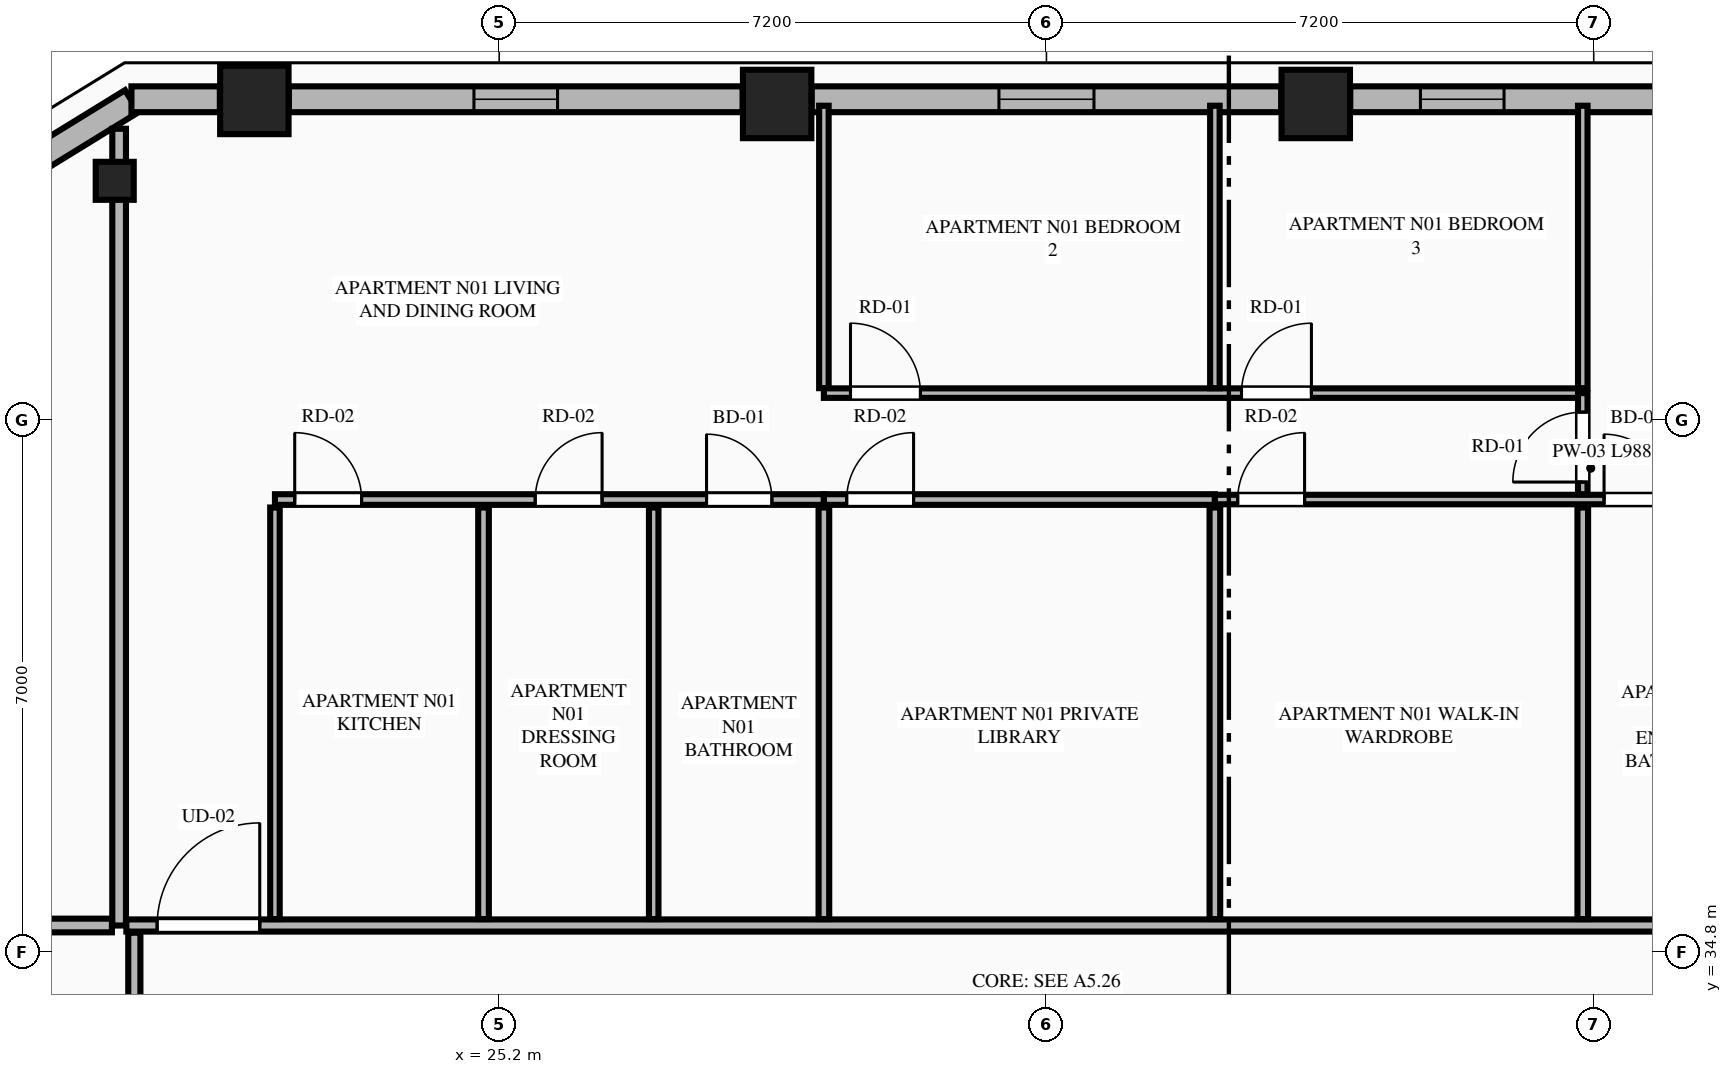
"""IFC4 building model, lengths in metres.
Left out: names, types, materials, properties, quantities, classifications, styles, units other than length and angle.
Written with IfcOpenShell. Run it as: python <this file> out.ifc"""

import sys

from ifc_helpers import new_model, si_unit, direction, frame, frame_2d, origin, origin_2d, place, context, subcontext, project, spatial, rectangle, extrude, element, fill, save


model = new_model("IFC4")
c1 = context("Model", 3, precision=1e-05, world=origin(), true_north=direction((0.0, 1.0)))
c2 = subcontext(c1, "Body", "Model", "MODEL_VIEW")
j1 = project(units=[si_unit("LENGTHUNIT", "METRE"), si_unit("PLANEANGLEUNIT", "RADIAN")], contexts=[c1])
p1 = place(None, origin())
s1 = spatial("IfcSite", under=j1, at=p1, CompositionType="ELEMENT")
p2 = place(p1, origin())
s2 = spatial("IfcBuilding", under=s1, at=p2, CompositionType="ELEMENT")
p3 = place(p2, frame((0.0, 0.0, 189.65)))
s3 = spatial("IfcBuildingStorey", under=s2, at=p3, CompositionType="ELEMENT", Elevation=189.65)
for number, where, z_axis, x_axis in (
    (1, (35.943, 45.958, 0.0), (0.0, 0.0, 1.0), (1.0, 0.0, 0.0)),
    (2, (28.857, 45.958, 0.0), (0.0, 0.0, 1.0), (1.0, 0.0, 0.0)),
    (3, (21.979, 46.011, 0.0), (0.0, 0.0, 1.0), (1.0, 0.0, 0.0)),
):
    element("IfcColumn", number, at=place(p3, frame(where, z_axis=z_axis, x_axis=x_axis)), inside=s3, PredefinedType="COLUMN", context=c2, shape_type="SweptSolid", body=[
        extrude(rectangle(XDim=0.9, YDim=0.9, at=origin_2d()), origin(), (0.0, 0.0, 1.0), 3.55),
    ])
p4 = place(p3, frame((20.142, 44.947, 0.0), z_axis=(0.0, 0.0, 1.0), x_axis=(-0.865230187018, -0.501374833306, 0.0)))
e4 = element("IfcColumn", 4, at=p4, inside=s3, PredefinedType="PILASTER", context=c2, shape_type="SweptSolid", body=[
    extrude(rectangle(XDim=0.5, YDim=0.35, at=origin_2d()), origin(), (0.0, 0.0, 1.0), 3.55),
])
p5 = place(p3, frame((20.367, 45.995, 0.0), z_axis=(0.0, 0.0, 1.0), x_axis=(-0.851713271379, -0.524008113828, 0.0)))
e5 = element("IfcWall", 5, at=p5, inside=s3, PredefinedType="STANDARD", context=c2, shape_type="SweptSolid", body=[
    extrude(rectangle(XDim=1.678, YDim=0.34, at=frame_2d((0.839, 0.0))), origin(), (0.0, 0.0, 1.0), 3.35),
])
p6 = place(p3, frame((42.367, 46.02, 0.0), z_axis=(0.0, 0.0, 1.0), x_axis=(-1.0, 0.0, 0.0)))
e6 = element("IfcWall", 6, at=p6, inside=s3, PredefinedType="STANDARD", context=c2, shape_type="SweptSolid", body=[
    extrude(rectangle(XDim=5.97, YDim=0.34, at=frame_2d((2.985, 0.0))), origin(), (0.0, 0.0, 1.0), 2.883),
])
p7 = place(p6, frame((0.849, 0.0, 0.75)))
e7 = element("IfcOpeningElement", 7, at=p7, cuts=e6, PredefinedType="OPENING", context=c2, shape_type="SweptSolid", body=[
    extrude(rectangle(XDim=1.1, YDim=1.983, at=frame_2d((0.55, 0.991))), frame((0.0, 0.18, 0.0), z_axis=(0.0, -1.0, 0.0), x_axis=(1.0, 0.0, 0.0)), (0.0, 0.0, 1.0), 0.36),
])
p8 = place(p6, frame((3.947, 0.0, 0.75)))
e8 = element("IfcOpeningElement", 8, at=p8, cuts=e6, PredefinedType="OPENING", context=c2, shape_type="SweptSolid", body=[
    extrude(rectangle(XDim=1.1, YDim=1.983, at=frame_2d((0.55, 0.991))), frame((0.0, 0.18, 0.0), z_axis=(0.0, -1.0, 0.0), x_axis=(1.0, 0.0, 0.0)), (0.0, 0.0, 1.0), 0.36),
])
p9 = place(p3, frame((35.489, 46.02, 0.0), z_axis=(0.0, 0.0, 1.0), x_axis=(-1.0, 0.0, 0.0)))
e9 = element("IfcWall", 9, at=p9, inside=s3, PredefinedType="STANDARD", context=c2, shape_type="SweptSolid", body=[
    extrude(rectangle(XDim=6.178, YDim=0.34, at=frame_2d((3.089, 0.0))), origin(), (0.0, 0.0, 1.0), 2.883),
])
p10 = place(p9, frame((2.464, 0.0, 0.75)))
e10 = element("IfcOpeningElement", 10, at=p10, cuts=e9, PredefinedType="OPENING", context=c2, shape_type="SweptSolid", body=[
    extrude(rectangle(XDim=1.25, YDim=1.95, at=frame_2d((0.625, 0.975))), frame((0.0, 0.18, 0.0), z_axis=(0.0, -1.0, 0.0), x_axis=(1.0, 0.0, 0.0)), (0.0, 0.0, 1.0), 0.36),
])
p11 = place(p3, frame((28.403, 46.02, 0.0), z_axis=(0.0, 0.0, 1.0), x_axis=(-1.0, 0.0, 0.0)))
e11 = element("IfcWall", 11, at=p11, inside=s3, PredefinedType="STANDARD", context=c2, shape_type="SweptSolid", body=[
    extrude(rectangle(XDim=5.97, YDim=0.34, at=frame_2d((2.985, 0.0))), origin(), (0.0, 0.0, 1.0), 2.883),
])
p12 = place(p11, frame((2.435, 0.0, 0.75)))
e12 = element("IfcOpeningElement", 12, at=p12, cuts=e11, PredefinedType="OPENING", context=c2, shape_type="SweptSolid", body=[
    extrude(rectangle(XDim=1.1, YDim=1.983, at=frame_2d((0.55, 0.991))), frame((0.0, 0.18, 0.0), z_axis=(0.0, -1.0, 0.0), x_axis=(1.0, 0.0, 0.0)), (0.0, 0.0, 1.0), 0.36),
])
p13 = place(p3, frame((21.525, 46.02, 0.0), z_axis=(0.0, 0.0, 1.0), x_axis=(-1.0, 0.0, 0.0)))
e13 = element("IfcWall", 13, at=p13, inside=s3, PredefinedType="STANDARD", context=c2, shape_type="SweptSolid", body=[
    extrude(rectangle(XDim=1.163, YDim=0.34, at=frame_2d((0.582, 0.0))), origin(), (0.0, 0.0, 1.0), 3.35),
])
p14 = place(p3, frame((20.2, 35.15, 0.0), z_axis=(0.0, 0.0, 1.0), x_axis=(0.0, 1.0, 0.0)))
e14 = element("IfcWall", 14, at=p14, inside=s3, PredefinedType="PARTITIONING", context=c2, shape_type="SweptSolid", body=[
    extrude(rectangle(XDim=10.482, YDim=0.18, at=frame_2d((5.241, 0.0))), origin(), (0.0, 0.0, 1.0), 3.35),
])
p15 = place(p3, frame((20.295, 35.15, 0.0), z_axis=(0.0, 0.0, 1.0), x_axis=(1.0, 0.0, 0.0)))
e15 = element("IfcWall", 15, at=p15, inside=s3, PredefinedType="PARTITIONING", context=c2, shape_type="SweptSolid", body=[
    extrude(rectangle(XDim=24.21, YDim=0.16, at=frame_2d((12.105, 0.0))), origin(), (0.0, 0.0, 1.0), 3.35),
])
p16 = place(p15, frame((0.405, 0.0, 0.0)))
e16 = element("IfcOpeningElement", 16, at=p16, cuts=e15, PredefinedType="OPENING", context=c2, shape_type="SweptSolid", body=[
    extrude(rectangle(XDim=1.35, YDim=2.35, at=frame_2d((0.675, 1.175))), frame((0.0, 0.09, 0.0), z_axis=(0.0, -1.0, 0.0), x_axis=(1.0, 0.0, 0.0)), (0.0, 0.0, 1.0), 0.18),
])
p17 = place(p3, frame((22.25, 35.235, 0.0), z_axis=(0.0, 0.0, 1.0), x_axis=(0.0, 1.0, 0.0)))
e17 = element("IfcWall", 17, at=p17, inside=s3, PredefinedType="PARTITIONING", context=c2, shape_type="SweptSolid", body=[
    extrude(rectangle(XDim=5.414, YDim=0.125, at=frame_2d((2.707, 0.0))), origin(), (0.0, 0.0, 1.0), 2.807),
])
p18 = place(p3, frame((22.25, 40.754, 0.0), z_axis=(0.0, 0.0, 1.0), x_axis=(1.0, 0.0, 0.0)))
e18 = element("IfcWall", 18, at=p18, inside=s3, PredefinedType="PLUMBINGWALL", context=c2, shape_type="SweptSolid", body=[
    extrude(rectangle(XDim=7.222, YDim=0.14, at=frame_2d((3.611, 0.0))), origin(), (0.0, 0.0, 1.0), 3.35),
])
p19 = place(p18, frame((5.678, 0.0, 0.0)))
e19 = element("IfcOpeningElement", 19, at=p19, cuts=e18, PredefinedType="OPENING", context=c2, shape_type="SweptSolid", body=[
    extrude(rectangle(XDim=0.86, YDim=2.1, at=frame_2d((0.43, 1.05))), frame((0.0, 0.08, 0.0), z_axis=(0.0, -1.0, 0.0), x_axis=(1.0, 0.0, 0.0)), (0.0, 0.0, 1.0), 0.16),
])
p20 = place(p18, frame((0.26, 0.0, 0.0)))
e20 = element("IfcOpeningElement", 20, at=p20, cuts=e18, PredefinedType="OPENING", context=c2, shape_type="SweptSolid", body=[
    extrude(rectangle(XDim=0.88, YDim=2.15, at=frame_2d((0.44, 1.075))), frame((0.0, 0.08, 0.0), z_axis=(0.0, -1.0, 0.0), x_axis=(1.0, 0.0, 0.0)), (0.0, 0.0, 1.0), 0.16),
])
p21 = place(p18, frame((3.424, 0.0, 0.0)))
e21 = element("IfcOpeningElement", 21, at=p21, cuts=e18, PredefinedType="OPENING", context=c2, shape_type="SweptSolid", body=[
    extrude(rectangle(XDim=0.88, YDim=2.15, at=frame_2d((0.44, 1.075))), frame((0.0, 0.08, 0.0), z_axis=(0.0, -1.0, 0.0), x_axis=(1.0, 0.0, 0.0)), (0.0, 0.0, 1.0), 0.16),
])
p22 = place(p3, frame((29.472, 40.754, 0.0), z_axis=(0.0, 0.0, 1.0), x_axis=(1.0, 0.0, 0.0)))
e22 = element("IfcWall", 22, at=p22, inside=s3, PredefinedType="PLUMBINGWALL", context=c2, shape_type="SweptSolid", body=[
    extrude(rectangle(XDim=5.144, YDim=0.14, at=frame_2d((2.572, 0.0))), origin(), (0.0, 0.0, 1.0), 3.35),
])
p23 = place(p22, frame((0.3, 0.0, 0.0)))
e23 = element("IfcOpeningElement", 23, at=p23, cuts=e22, PredefinedType="OPENING", context=c2, shape_type="SweptSolid", body=[
    extrude(rectangle(XDim=0.88, YDim=2.15, at=frame_2d((0.44, 1.075))), frame((0.0, 0.08, 0.0), z_axis=(0.0, -1.0, 0.0), x_axis=(1.0, 0.0, 0.0)), (0.0, 0.0, 1.0), 0.16),
])
p24 = place(p3, frame((34.616, 40.754, 0.0), z_axis=(0.0, 0.0, 1.0), x_axis=(1.0, 0.0, 0.0)))
e24 = element("IfcWall", 24, at=p24, inside=s3, PredefinedType="PARTITIONING", context=c2, shape_type="SweptSolid", body=[
    extrude(rectangle(XDim=9.889, YDim=0.125, at=frame_2d((4.944, 0.0))), origin(), (0.0, 0.0, 1.0), 3.35),
])
p25 = place(p24, frame((5.12, 0.0, 0.0)))
e25 = element("IfcOpeningElement", 25, at=p25, cuts=e24, PredefinedType="OPENING", context=c2, shape_type="SweptSolid", body=[
    extrude(rectangle(XDim=0.86, YDim=2.1, at=frame_2d((0.43, 1.05))), frame((0.0, 0.073, 0.0), z_axis=(0.0, -1.0, 0.0), x_axis=(1.0, 0.0, 0.0)), (0.0, 0.0, 1.0), 0.145),
])
p26 = place(p24, frame((7.655, 0.0, 0.0)))
e26 = element("IfcOpeningElement", 26, at=p26, cuts=e24, PredefinedType="OPENING", context=c2, shape_type="SweptSolid", body=[
    extrude(rectangle(XDim=0.88, YDim=2.15, at=frame_2d((0.44, 1.075))), frame((0.0, 0.073, 0.0), z_axis=(0.0, -1.0, 0.0), x_axis=(1.0, 0.0, 0.0)), (0.0, 0.0, 1.0), 0.145),
])
p27 = place(p24, frame((0.3, 0.0, 0.0)))
e27 = element("IfcOpeningElement", 27, at=p27, cuts=e24, PredefinedType="OPENING", context=c2, shape_type="SweptSolid", body=[
    extrude(rectangle(XDim=0.88, YDim=2.15, at=frame_2d((0.44, 1.075))), frame((0.0, 0.073, 0.0), z_axis=(0.0, -1.0, 0.0), x_axis=(1.0, 0.0, 0.0)), (0.0, 0.0, 1.0), 0.145),
])
p28 = place(p3, frame((24.994, 35.235, 0.0), z_axis=(0.0, 0.0, 1.0), x_axis=(0.0, 1.0, 0.0)))
e28 = element("IfcWall", 28, at=p28, inside=s3, PredefinedType="PLUMBINGWALL", context=c2, shape_type="SweptSolid", body=[
    extrude(rectangle(XDim=5.414, YDim=0.14, at=frame_2d((2.707, 0.0))), origin(), (0.0, 0.0, 1.0), 3.35),
])
p29 = place(p3, frame((27.233, 35.235, 0.0), z_axis=(0.0, 0.0, 1.0), x_axis=(0.0, 1.0, 0.0)))
e29 = element("IfcWall", 29, at=p29, inside=s3, PredefinedType="PARTITIONING", context=c2, shape_type="SweptSolid", body=[
    extrude(rectangle(XDim=5.414, YDim=0.125, at=frame_2d((2.707, 0.0))), origin(), (0.0, 0.0, 1.0), 3.35),
])
p30 = place(p3, frame((29.472, 42.219, 0.0), z_axis=(0.0, 0.0, 1.0), x_axis=(0.0, 1.0, 0.0)))
e30 = element("IfcWall", 30, at=p30, inside=s3, PredefinedType="PARTITIONING", context=c2, shape_type="SweptSolid", body=[
    extrude(rectangle(XDim=3.716, YDim=0.125, at=frame_2d((1.858, 0.0))), origin(), (0.0, 0.0, 1.0), 3.35),
])
p31 = place(p3, frame((29.472, 42.154, 0.0), z_axis=(0.0, 0.0, 1.0), x_axis=(1.0, 0.0, 0.0)))
e31 = element("IfcWall", 31, at=p31, inside=s3, PredefinedType="PARTITIONING", context=c2, shape_type="SweptSolid", body=[
    extrude(rectangle(XDim=9.984, YDim=0.125, at=frame_2d((4.992, 0.0))), origin(), (0.0, 0.0, 1.0), 3.35),
])
p32 = place(p31, frame((0.35, 0.0, 0.0)))
e32 = element("IfcOpeningElement", 32, at=p32, cuts=e31, PredefinedType="OPENING", context=c2, shape_type="SweptSolid", body=[
    extrude(rectangle(XDim=0.92, YDim=2.15, at=frame_2d((0.46, 1.075))), frame((0.0, 0.073, 0.0), z_axis=(0.0, -1.0, 0.0), x_axis=(1.0, 0.0, 0.0)), (0.0, 0.0, 1.0), 0.145),
])
p33 = place(p31, frame((5.494, 0.0, 0.0)))
e33 = element("IfcOpeningElement", 33, at=p33, cuts=e31, PredefinedType="OPENING", context=c2, shape_type="SweptSolid", body=[
    extrude(rectangle(XDim=0.92, YDim=2.15, at=frame_2d((0.46, 1.075))), frame((0.0, 0.073, 0.0), z_axis=(0.0, -1.0, 0.0), x_axis=(1.0, 0.0, 0.0)), (0.0, 0.0, 1.0), 0.145),
])
p34 = place(p3, frame((39.456, 40.824, 0.0), z_axis=(0.0, 0.0, 1.0), x_axis=(0.0, 1.0, 0.0)))
e34 = element("IfcWall", 34, at=p34, inside=s3, PredefinedType="PARTITIONING", context=c2, shape_type="SweptSolid", body=[
    extrude(rectangle(XDim=1.33, YDim=0.125, at=frame_2d((0.665, 0.0))), origin(), (0.0, 0.0, 1.0), 3.35),
])
p35 = place(p34, frame((0.16, 0.0, 0.0)))
e35 = element("IfcOpeningElement", 35, at=p35, cuts=e34, PredefinedType="OPENING", context=c2, shape_type="SweptSolid", body=[
    extrude(rectangle(XDim=0.92, YDim=2.15, at=frame_2d((0.46, 1.075))), frame((0.0, 0.073, 0.0), z_axis=(0.0, -1.0, 0.0), x_axis=(1.0, 0.0, 0.0)), (0.0, 0.0, 1.0), 0.145),
])
for number, where, z_axis, x_axis in (
    (36, (29.472, 35.235, 0.0), (0.0, 0.0, 1.0), (0.0, 1.0, 0.0)),
    (37, (34.616, 35.235, 0.0), (0.0, 0.0, 1.0), (0.0, 1.0, 0.0)),
):
    element("IfcWall", number, at=place(p3, frame(where, z_axis=z_axis, x_axis=x_axis)), inside=s3, PredefinedType="PLUMBINGWALL", context=c2, shape_type="SweptSolid", body=[
        extrude(rectangle(XDim=5.414, YDim=0.14, at=frame_2d((2.707, 0.0))), origin(), (0.0, 0.0, 1.0), 3.35),
    ])
for number, where, z_axis, x_axis in (
    (38, (34.616, 42.219, 0.0), (0.0, 0.0, 1.0), (0.0, 1.0, 0.0)),
    (39, (39.456, 42.219, 0.0), (0.0, 0.0, 1.0), (0.0, 1.0, 0.0)),
):
    element("IfcWall", number, at=place(p3, frame(where, z_axis=z_axis, x_axis=x_axis)), inside=s3, PredefinedType="PARTITIONING", context=c2, shape_type="SweptSolid", body=[
        extrude(rectangle(XDim=3.716, YDim=0.125, at=frame_2d((1.858, 0.0))), origin(), (0.0, 0.0, 1.0), 3.35),
    ])
p36 = place(p3, frame((39.456, 35.235, 0.0), z_axis=(0.0, 0.0, 1.0), x_axis=(0.0, 1.0, 0.0)))
e40 = element("IfcWall", 40, at=p36, inside=s3, PredefinedType="PLUMBINGWALL", context=c2, shape_type="SweptSolid", body=[
    extrude(rectangle(XDim=5.414, YDim=0.14, at=frame_2d((2.707, 0.0))), origin(), (0.0, 0.0, 1.0), 3.35),
])
p37 = place(p3, frame((14.11, 35.15, 0.0), z_axis=(0.0, 0.0, 1.0), x_axis=(1.0, 0.0, 0.0)))
e41 = element("IfcWall", 41, at=p37, inside=s3, PredefinedType="PARTITIONING", context=c2, shape_type="SweptSolid", body=[
    extrude(rectangle(XDim=5.995, YDim=0.18, at=frame_2d((2.998, 0.0))), origin(), (0.0, 0.0, 1.0), 3.35),
])
p38 = place(p3, frame((20.4, 25.039, 0.0), z_axis=(0.0, 0.0, 1.0), x_axis=(0.0, 1.0, 0.0)))
e42 = element("IfcWall", 42, at=p38, inside=s3, PredefinedType="PARTITIONING", context=c2, shape_type="SweptSolid", body=[
    extrude(rectangle(XDim=10.016, YDim=0.16, at=frame_2d((5.008, 0.0))), origin(), (0.0, 0.0, 1.0), 3.35),
])
p39 = place(p38, frame((0.45, 0.0, 0.0)))
e43 = element("IfcOpeningElement", 43, at=p39, cuts=e42, PredefinedType="OPENING", context=c2, shape_type="SweptSolid", body=[
    extrude(rectangle(XDim=1.02, YDim=2.25, at=frame_2d((0.51, 1.125))), frame((0.0, 0.09, 0.0), z_axis=(0.0, -1.0, 0.0), x_axis=(1.0, 0.0, 0.0)), (0.0, 0.0, 1.0), 0.18),
])
p40 = place(p10, origin())
e44 = element("IfcWindow", 44, at=p40, inside=s3, PartitioningType="SINGLE_PANEL", PredefinedType="WINDOW", context=c2, shape_type="SweptSolid", body=[
    extrude(rectangle(XDim=1.25, YDim=1.95, at=frame_2d((0.625, 0.975))), frame((0.0, 0.03, 0.0), z_axis=(0.0, -1.0, 0.0), x_axis=(1.0, 0.0, 0.0)), (0.0, 0.0, 1.0), 0.06),
])
fill(e10, e44)
p41 = place(p12, origin())
e45 = element("IfcWindow", 45, at=p41, inside=s3, PartitioningType="SINGLE_PANEL", PredefinedType="WINDOW", context=c2, shape_type="SweptSolid", body=[
    extrude(rectangle(XDim=1.1, YDim=1.983, at=frame_2d((0.55, 0.991))), frame((0.0, 0.03, 0.0), z_axis=(0.0, -1.0, 0.0), x_axis=(1.0, 0.0, 0.0)), (0.0, 0.0, 1.0), 0.06),
])
fill(e12, e45)
p42 = place(p19, origin())
e46 = element("IfcDoor", 46, at=p42, inside=s3, OperationType="SINGLE_SWING_LEFT", PredefinedType="DOOR", context=c2, shape_type="SweptSolid", body=[
    extrude(rectangle(XDim=0.86, YDim=2.1, at=frame_2d((0.43, 1.05))), frame((0.0, 0.025, 0.0), z_axis=(0.0, -1.0, 0.0), x_axis=(1.0, 0.0, 0.0)), (0.0, 0.0, 1.0), 0.05),
])
fill(e19, e46)
p43 = place(p25, origin())
e47 = element("IfcDoor", 47, at=p43, inside=s3, OperationType="SINGLE_SWING_LEFT", PredefinedType="DOOR", context=c2, shape_type="SweptSolid", body=[
    extrude(rectangle(XDim=0.86, YDim=2.1, at=frame_2d((0.43, 1.05))), frame((0.0, 0.025, 0.0), z_axis=(0.0, -1.0, 0.0), x_axis=(1.0, 0.0, 0.0)), (0.0, 0.0, 1.0), 0.05),
])
fill(e25, e47)
p44 = place(p16, origin())
e48 = element("IfcDoor", 48, at=p44, inside=s3, OperationType="SINGLE_SWING_RIGHT", PredefinedType="DOOR", context=c2, shape_type="SweptSolid", body=[
    extrude(rectangle(XDim=1.35, YDim=2.35, at=frame_2d((0.675, 1.175))), frame((0.0, 0.025, 0.0), z_axis=(0.0, -1.0, 0.0), x_axis=(1.0, 0.0, 0.0)), (0.0, 0.0, 1.0), 0.05),
])
fill(e16, e48)
p45 = place(p20, origin())
e49 = element("IfcDoor", 49, at=p45, inside=s3, OperationType="SINGLE_SWING_LEFT", PredefinedType="DOOR", context=c2, shape_type="SweptSolid", body=[
    extrude(rectangle(XDim=0.88, YDim=2.15, at=frame_2d((0.44, 1.075))), frame((0.0, 0.025, 0.0), z_axis=(0.0, -1.0, 0.0), x_axis=(1.0, 0.0, 0.0)), (0.0, 0.0, 1.0), 0.05),
])
fill(e20, e49)
p46 = place(p21, origin())
e50 = element("IfcDoor", 50, at=p46, inside=s3, OperationType="SINGLE_SWING_RIGHT", PredefinedType="DOOR", context=c2, shape_type="SweptSolid", body=[
    extrude(rectangle(XDim=0.88, YDim=2.15, at=frame_2d((0.44, 1.075))), frame((0.0, 0.025, 0.0), z_axis=(0.0, -1.0, 0.0), x_axis=(1.0, 0.0, 0.0)), (0.0, 0.0, 1.0), 0.05),
])
fill(e21, e50)
p47 = place(p23, origin())
e51 = element("IfcDoor", 51, at=p47, inside=s3, OperationType="SINGLE_SWING_RIGHT", PredefinedType="DOOR", context=c2, shape_type="SweptSolid", body=[
    extrude(rectangle(XDim=0.88, YDim=2.15, at=frame_2d((0.44, 1.075))), frame((0.0, 0.025, 0.0), z_axis=(0.0, -1.0, 0.0), x_axis=(1.0, 0.0, 0.0)), (0.0, 0.0, 1.0), 0.05),
])
fill(e23, e51)
p48 = place(p32, origin())
e52 = element("IfcDoor", 52, at=p48, inside=s3, OperationType="SINGLE_SWING_LEFT", PredefinedType="DOOR", context=c2, shape_type="SweptSolid", body=[
    extrude(rectangle(XDim=0.92, YDim=2.15, at=frame_2d((0.46, 1.075))), frame((0.0, 0.025, 0.0), z_axis=(0.0, -1.0, 0.0), x_axis=(1.0, 0.0, 0.0)), (0.0, 0.0, 1.0), 0.05),
])
fill(e32, e52)
p49 = place(p33, origin())
e53 = element("IfcDoor", 53, at=p49, inside=s3, OperationType="SINGLE_SWING_RIGHT", PredefinedType="DOOR", context=c2, shape_type="SweptSolid", body=[
    extrude(rectangle(XDim=0.92, YDim=2.15, at=frame_2d((0.46, 1.075))), frame((0.0, 0.025, 0.0), z_axis=(0.0, -1.0, 0.0), x_axis=(1.0, 0.0, 0.0)), (0.0, 0.0, 1.0), 0.05),
])
fill(e33, e53)
p50 = place(p35, origin())
e54 = element("IfcDoor", 54, at=p50, inside=s3, OperationType="SINGLE_SWING_LEFT", PredefinedType="DOOR", context=c2, shape_type="SweptSolid", body=[
    extrude(rectangle(XDim=0.92, YDim=2.15, at=frame_2d((0.46, 1.075))), frame((0.0, 0.025, 0.0), z_axis=(0.0, -1.0, 0.0), x_axis=(1.0, 0.0, 0.0)), (0.0, 0.0, 1.0), 0.05),
])
fill(e35, e54)
p51 = place(p27, origin())
e55 = element("IfcDoor", 55, at=p51, inside=s3, OperationType="SINGLE_SWING_RIGHT", PredefinedType="DOOR", context=c2, shape_type="SweptSolid", body=[
    extrude(rectangle(XDim=0.88, YDim=2.15, at=frame_2d((0.44, 1.075))), frame((0.0, 0.025, 0.0), z_axis=(0.0, -1.0, 0.0), x_axis=(1.0, 0.0, 0.0)), (0.0, 0.0, 1.0), 0.05),
])
fill(e27, e55)
p52 = place(p8, origin())
e56 = element("IfcWindow", 56, at=p52, inside=s3, PartitioningType="SINGLE_PANEL", PredefinedType="WINDOW", context=c2, shape_type="SweptSolid", body=[
    extrude(rectangle(XDim=1.1, YDim=1.983, at=frame_2d((0.55, 0.991))), frame((0.0, 0.03, 0.0), z_axis=(0.0, -1.0, 0.0), x_axis=(1.0, 0.0, 0.0)), (0.0, 0.0, 1.0), 0.06),
])
fill(e8, e56)
save(model, sys.argv[1])
